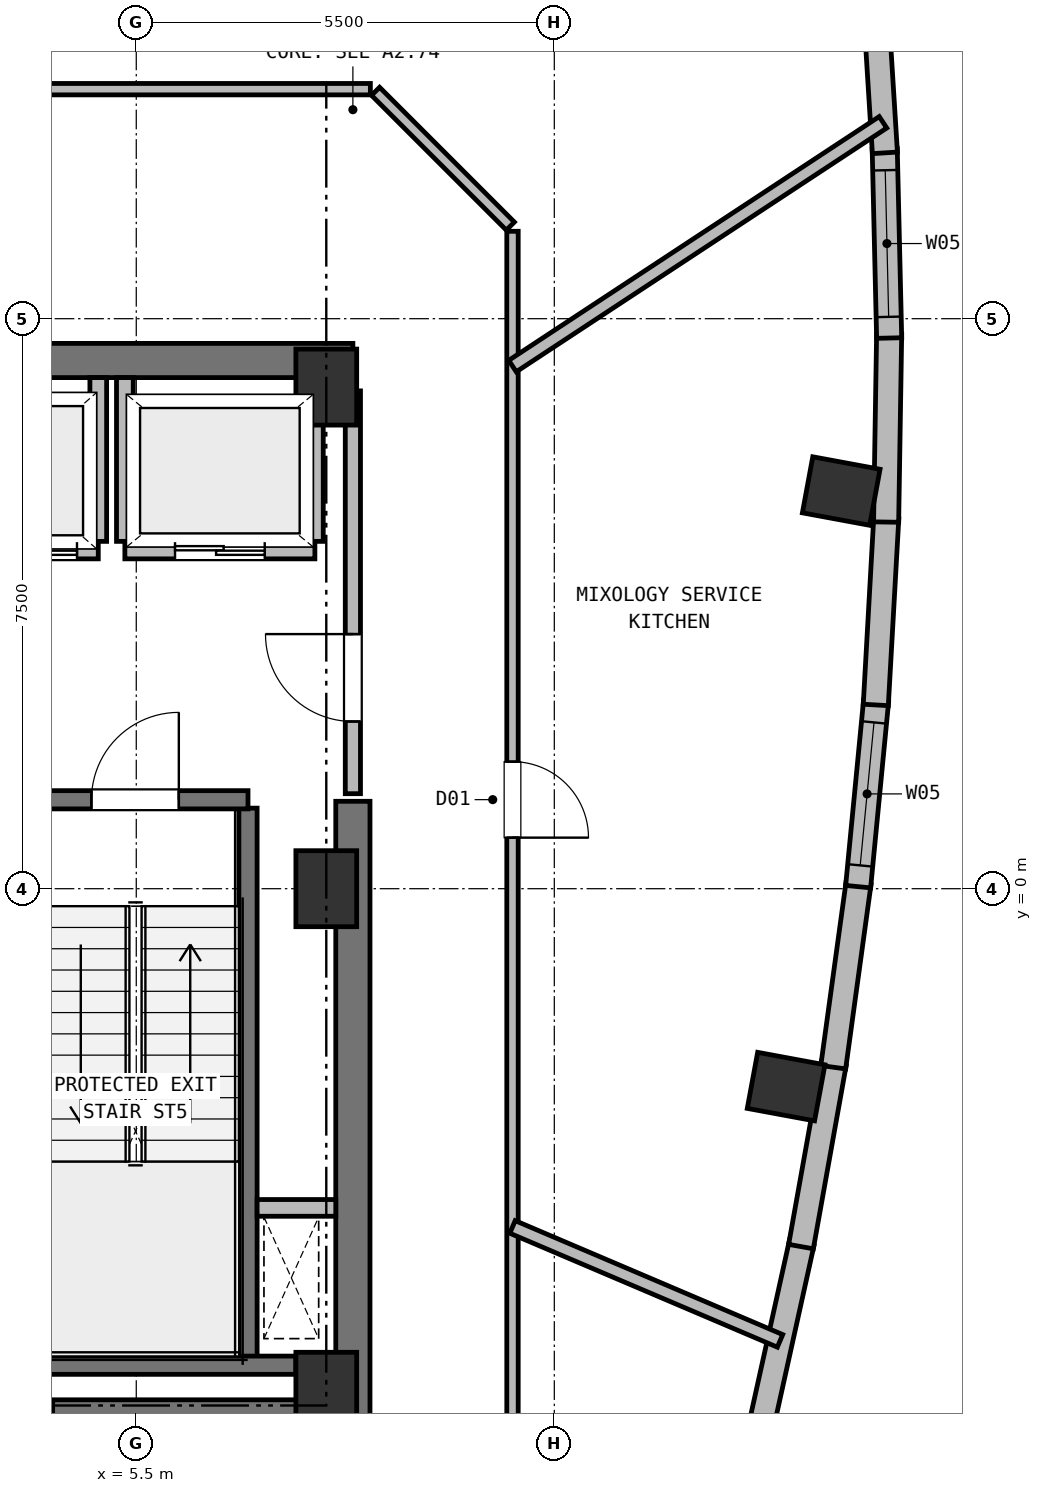
"""IFC4 building model, lengths in metres.
Left out: names, types, materials, properties, quantities, classifications, styles, units other than length and angle.
Written with IfcOpenShell. Run it as: python <this file> out.ifc"""

import sys

from ifc_helpers import new_model, si_unit, direction, frame, frame_2d, origin, origin_2d, place, context, subcontext, project, spatial, rectangle, extrude, element, fill, save


model = new_model("IFC4")
c1 = context("Model", 3, precision=1e-05, world=origin(), true_north=direction((0.0, 1.0)))
c2 = subcontext(c1, "Body", "Model", "MODEL_VIEW")
j1 = project(units=[si_unit("LENGTHUNIT", "METRE"), si_unit("PLANEANGLEUNIT", "RADIAN")], contexts=[c1])
p1 = place(None, origin())
s1 = spatial("IfcSite", under=j1, at=p1, CompositionType="ELEMENT")
p2 = place(p1, origin())
s2 = spatial("IfcBuilding", under=s1, at=p2, CompositionType="ELEMENT")
p3 = place(p2, frame((0.0, 0.0, 281.6)))
s3 = spatial("IfcBuildingStorey", under=s2, at=p3, CompositionType="ELEMENT", Elevation=281.6)
for number, where, z_axis, x_axis in (
    (1, (8.0, -6.6, 0.0), (0.0, 0.0, 1.0), (1.0, 0.0, 0.0)),
    (2, (8.0, 0.0, 0.0), (0.0, 0.0, 1.0), (1.0, 0.0, 0.0)),
    (3, (8.0, 6.6, 0.0), (0.0, 0.0, 1.0), (1.0, 0.0, 0.0)),
):
    element("IfcColumn", number, at=place(p3, frame(where, z_axis=z_axis, x_axis=x_axis)), inside=s3, PredefinedType="COLUMN", context=c2, shape_type="SweptSolid", body=[
        extrude(rectangle(XDim=0.8, YDim=1.0, at=origin_2d()), origin(), (0.0, 0.0, 1.0), 4.4),
    ])
p4 = place(p3, frame((-8.35, 6.95, 0.0), z_axis=(0.0, 0.0, 1.0), x_axis=(1.0, 0.0, 0.0)))
e4 = element("IfcWall", 4, at=p4, inside=s3, PredefinedType="SHEAR", context=c2, shape_type="SweptSolid", body=[
    extrude(rectangle(XDim=16.7, YDim=0.45, at=frame_2d((8.35, 0.0))), origin(), (0.0, 0.0, 1.0), 4.13),
])
p5 = place(p3, frame((4.4, -6.95, 0.0), z_axis=(0.0, 0.0, 1.0), x_axis=(1.0, 0.0, 0.0)))
e5 = element("IfcWall", 5, at=p5, inside=s3, PredefinedType="SHEAR", context=c2, shape_type="SweptSolid", body=[
    extrude(rectangle(XDim=3.95, YDim=0.45, at=frame_2d((1.975, 0.0))), origin(), (0.0, 0.0, 1.0), 4.13),
])
p6 = place(p3, frame((8.35, -6.95, 0.0), z_axis=(0.0, 0.0, 1.0), x_axis=(0.0, 1.0, 0.0)))
e6 = element("IfcWall", 6, at=p6, inside=s3, PredefinedType="SHEAR", context=c2, shape_type="SweptSolid", body=[
    extrude(rectangle(XDim=8.1, YDim=0.45, at=frame_2d((4.05, 0.0))), origin(), (0.0, 0.0, 1.0), 4.13),
])
for number, where, z_axis, x_axis in (
    (7, (14.05, -2.604, 0.0), (0.0, 0.0, 1.0), (0.182, 0.983, 0.0)),
    (8, (14.775, 5.232, 0.0), (0.0, 0.0, 1.0), (0.182, 0.983, 0.0)),
):
    element("IfcColumn", number, at=place(p3, frame(where, z_axis=z_axis, x_axis=x_axis)), inside=s3, PredefinedType="COLUMN", context=c2, shape_type="SweptSolid", body=[
        extrude(rectangle(XDim=0.75, YDim=0.9, at=origin_2d()), origin(), (0.0, 0.0, 1.0), 4.4),
    ])
p7 = place(p3, frame((14.255, -4.66, 0.0), z_axis=(0.0, 0.0, 1.0), x_axis=(-0.216160793087, -0.976357778446, 0.0)))
e9 = element("IfcWall", 9, at=p7, inside=s3, PredefinedType="SOLIDWALL", context=c2, shape_type="SweptSolid", body=[
    extrude(rectangle(XDim=2.452, YDim=0.33, at=frame_2d((1.226, 0.0))), origin(), (0.0, 0.0, 1.0), 4.13),
])
p8 = place(p3, frame((14.677, -2.299, 0.0), z_axis=(0.0, 0.0, 1.0), x_axis=(-0.176418802695, -0.984315196497, 0.0)))
e10 = element("IfcWall", 10, at=p8, inside=s3, PredefinedType="SOLIDWALL", context=c2, shape_type="SweptSolid", body=[
    extrude(rectangle(XDim=2.448, YDim=0.33, at=frame_2d((1.224, 0.0))), origin(), (0.0, 0.0, 1.0), 4.13),
])
p9 = place(p3, frame((15.003, 0.077, 0.0), z_axis=(0.0, 0.0, 1.0), x_axis=(-0.136310087879, -0.990666220249, 0.0)))
e11 = element("IfcWall", 11, at=p9, inside=s3, PredefinedType="SOLIDWALL", context=c2, shape_type="SweptSolid", body=[
    extrude(rectangle(XDim=2.448, YDim=0.33, at=frame_2d((1.224, 0.0))), origin(), (0.0, 0.0, 1.0), 4.13),
])
p10 = place(p3, frame((15.233, 2.468, 0.0), z_axis=(0.0, 0.0, 1.0), x_axis=(-0.096171472172, -0.995364781344, 0.0)))
e12 = element("IfcWall", 12, at=p10, inside=s3, PredefinedType="SOLIDWALL", context=c2, shape_type="SweptSolid", body=[
    extrude(rectangle(XDim=2.452, YDim=0.33, at=frame_2d((1.226, 0.0))), origin(), (0.0, 0.0, 1.0), 4.13),
])
p11 = place(p10, frame((0.281, 0.0, 0.72)))
e13 = element("IfcOpeningElement", 13, at=p11, cuts=e12, PredefinedType="OPENING", context=c2, shape_type="SweptSolid", body=[
    extrude(rectangle(XDim=1.89, YDim=2.15, at=frame_2d((0.945, 1.075))), frame((0.0, 0.175, 0.0), z_axis=(0.0, -1.0, 0.0), x_axis=(1.0, 0.0, 0.0)), (0.0, 0.0, 1.0), 0.35),
])
p12 = place(p3, frame((15.367, 4.874, 0.0), z_axis=(0.0, 0.0, 1.0), x_axis=(-0.055970171644, -0.998432441323, 0.0)))
e14 = element("IfcWall", 14, at=p12, inside=s3, PredefinedType="SOLIDWALL", context=c2, shape_type="SweptSolid", body=[
    extrude(rectangle(XDim=2.46, YDim=0.33, at=frame_2d((1.23, 0.0))), origin(), (0.0, 0.0, 1.0), 4.13),
])
p13 = place(p3, frame((15.406, 7.295, 0.0), z_axis=(0.0, 0.0, 1.0), x_axis=(-0.016099859072, -0.999870388869, 0.0)))
e15 = element("IfcWall", 15, at=p13, inside=s3, PredefinedType="SOLIDWALL", context=c2, shape_type="SweptSolid", body=[
    extrude(rectangle(XDim=2.472, YDim=0.33, at=frame_2d((1.236, 0.0))), origin(), (0.0, 0.0, 1.0), 4.13),
])
p14 = place(p3, frame((15.347, 9.732, 0.0), z_axis=(0.0, 0.0, 1.0), x_axis=(0.023459423149, -0.999724789862, 0.0)))
e16 = element("IfcWall", 16, at=p14, inside=s3, PredefinedType="SOLIDWALL", context=c2, shape_type="SweptSolid", body=[
    extrude(rectangle(XDim=2.487, YDim=0.33, at=frame_2d((1.244, 0.0))), origin(), (0.0, 0.0, 1.0), 4.13),
])
p15 = place(p14, frame((0.279, 0.0, 0.72)))
e17 = element("IfcOpeningElement", 17, at=p15, cuts=e16, PredefinedType="OPENING", context=c2, shape_type="SweptSolid", body=[
    extrude(rectangle(XDim=1.93, YDim=2.15, at=frame_2d((0.965, 1.075))), frame((0.0, 0.175, 0.0), z_axis=(0.0, -1.0, 0.0), x_axis=(1.0, 0.0, 0.0)), (0.0, 0.0, 1.0), 0.35),
])
p16 = place(p3, frame((15.193, 12.184, 0.0), z_axis=(0.0, 0.0, 1.0), x_axis=(0.062329780416, -0.998055608908, 0.0)))
e18 = element("IfcWall", 18, at=p16, inside=s3, PredefinedType="SOLIDWALL", context=c2, shape_type="SweptSolid", body=[
    extrude(rectangle(XDim=2.507, YDim=0.33, at=frame_2d((1.253, 0.0))), origin(), (0.0, 0.0, 1.0), 4.13),
])
p17 = place(p3, frame((6.97, -6.16, 0.0), z_axis=(0.0, 0.0, 1.0), x_axis=(0.0, 1.0, 0.0)))
e19 = element("IfcWall", 19, at=p17, inside=s3, PredefinedType="SHEAR", context=c2, shape_type="SweptSolid", body=[
    extrude(rectangle(XDim=7.22, YDim=0.24, at=frame_2d((3.61, 0.0))), origin(), (0.0, 0.0, 1.0), 4.13),
])
p18 = place(p3, frame((4.01, -6.27, 0.0), z_axis=(0.0, 0.0, 1.0), x_axis=(1.0, 0.0, 0.0)))
e20 = element("IfcWall", 20, at=p18, inside=s3, PredefinedType="SHEAR", context=c2, shape_type="SweptSolid", body=[
    extrude(rectangle(XDim=3.59, YDim=0.24, at=frame_2d((1.795, 0.0))), origin(), (0.0, 0.0, 1.0), 4.13),
])
p19 = place(p3, frame((4.01, 1.17, 0.0), z_axis=(0.0, 0.0, 1.0), x_axis=(1.0, 0.0, 0.0)))
e21 = element("IfcWall", 21, at=p19, inside=s3, PredefinedType="SHEAR", context=c2, shape_type="SweptSolid", body=[
    extrude(rectangle(XDim=2.96, YDim=0.24, at=frame_2d((1.48, 0.0))), origin(), (0.0, 0.0, 1.0), 4.13),
])
p20 = place(p19, frame((0.9, 0.0, 0.0)))
e22 = element("IfcOpeningElement", 22, at=p20, cuts=e21, PredefinedType="OPENING", context=c2, shape_type="SweptSolid", body=[
    extrude(rectangle(XDim=1.15, YDim=2.15, at=frame_2d((0.575, 1.075))), frame((0.0, 0.13, 0.0), z_axis=(0.0, -1.0, 0.0), x_axis=(1.0, 0.0, 0.0)), (0.0, 0.0, 1.0), 0.26),
])
p21 = place(p3, frame((7.09, -4.2, 0.0), z_axis=(0.0, 0.0, 1.0), x_axis=(1.0, 0.0, 0.0)))
e23 = element("IfcWall", 23, at=p21, inside=s3, PredefinedType="PARTITIONING", context=c2, shape_type="SweptSolid", body=[
    extrude(rectangle(XDim=1.035, YDim=0.22, at=frame_2d((0.518, 0.0))), origin(), (0.0, 0.0, 1.0), 4.13),
])
p22 = place(p3, frame((5.35, 4.45, 0.0), z_axis=(0.0, 0.0, 1.0), x_axis=(1.0, 0.0, 0.0)))
e24 = element("IfcWall", 24, at=p22, inside=s3, PredefinedType="PARTITIONING", context=c2, shape_type="SweptSolid", body=[
    extrude(rectangle(XDim=2.5, YDim=0.22, at=frame_2d((1.25, 0.0))), origin(), (0.0, 0.0, 1.0), 4.13),
])
p23 = place(p22, frame((0.66, 0.0, 0.0)))
e25 = element("IfcOpeningElement", 25, at=p23, cuts=e24, PredefinedType="OPENING", context=c2, shape_type="SweptSolid", body=[
    extrude(rectangle(XDim=1.18, YDim=2.15, at=frame_2d((0.59, 1.075))), frame((0.0, 0.12, 0.0), z_axis=(0.0, -1.0, 0.0), x_axis=(1.0, 0.0, 0.0)), (0.0, 0.0, 1.0), 0.24),
])
p24 = place(p3, frame((5.35, 4.57, 0.0), z_axis=(0.0, 0.0, 1.0), x_axis=(0.0, 1.0, 0.0)))
e26 = element("IfcWall", 26, at=p24, inside=s3, PredefinedType="PARTITIONING", context=c2, shape_type="SweptSolid", body=[
    extrude(rectangle(XDim=2.155, YDim=0.22, at=frame_2d((1.078, 0.0))), origin(), (0.0, 0.0, 1.0), 4.13),
])
p25 = place(p3, frame((7.85, 4.57, 0.0), z_axis=(0.0, 0.0, 1.0), x_axis=(0.0, 1.0, 0.0)))
e27 = element("IfcWall", 27, at=p25, inside=s3, PredefinedType="PARTITIONING", context=c2, shape_type="SweptSolid", body=[
    extrude(rectangle(XDim=2.155, YDim=0.22, at=frame_2d((1.078, 0.0))), origin(), (0.0, 0.0, 1.0), 3.81),
])
p26 = place(p3, frame((2.6, 4.45, 0.0), z_axis=(0.0, 0.0, 1.0), x_axis=(1.0, 0.0, 0.0)))
e28 = element("IfcWall", 28, at=p26, inside=s3, PredefinedType="PARTITIONING", context=c2, shape_type="SweptSolid", body=[
    extrude(rectangle(XDim=2.4, YDim=0.22, at=frame_2d((1.2, 0.0))), origin(), (0.0, 0.0, 1.0), 4.13),
])
p27 = place(p26, frame((0.9, 0.0, 0.0)))
e29 = element("IfcOpeningElement", 29, at=p27, cuts=e28, PredefinedType="OPENING", context=c2, shape_type="SweptSolid", body=[
    extrude(rectangle(XDim=1.22, YDim=2.15, at=frame_2d((0.61, 1.075))), frame((0.0, 0.12, 0.0), z_axis=(0.0, -1.0, 0.0), x_axis=(1.0, 0.0, 0.0)), (0.0, 0.0, 1.0), 0.24),
])
p28 = place(p3, frame((5.0, 4.57, 0.0), z_axis=(0.0, 0.0, 1.0), x_axis=(0.0, 1.0, 0.0)))
e30 = element("IfcWall", 30, at=p28, inside=s3, PredefinedType="PARTITIONING", context=c2, shape_type="SweptSolid", body=[
    extrude(rectangle(XDim=2.155, YDim=0.22, at=frame_2d((1.078, 0.0))), origin(), (0.0, 0.0, 1.0), 4.13),
])
p29 = place(p3, frame((8.35, 1.25, 0.0), z_axis=(0.0, 0.0, 1.0), x_axis=(0.0, 1.0, 0.0)))
e31 = element("IfcWall", 31, at=p29, inside=s3, PredefinedType="PARTITIONING", context=c2, shape_type="SweptSolid", body=[
    extrude(rectangle(XDim=5.3, YDim=0.2, at=frame_2d((2.65, 0.0))), origin(), (0.0, 0.0, 1.0), 4.13),
])
p30 = place(p29, frame((0.95, 0.0, 0.0)))
e32 = element("IfcOpeningElement", 32, at=p30, cuts=e31, PredefinedType="OPENING", context=c2, shape_type="SweptSolid", body=[
    extrude(rectangle(XDim=1.15, YDim=2.15, at=frame_2d((0.575, 1.075))), frame((0.0, 0.11, 0.0), z_axis=(0.0, -1.0, 0.0), x_axis=(1.0, 0.0, 0.0)), (0.0, 0.0, 1.0), 0.22),
])
p31 = place(p3, frame((10.45, 8.65, 0.0), z_axis=(0.0, 0.0, 1.0), x_axis=(0.0, -1.0, 0.0)))
e33 = element("IfcWall", 33, at=p31, inside=s3, PredefinedType="PARTITIONING", context=c2, shape_type="SweptSolid", body=[
    extrude(rectangle(XDim=15.89, YDim=0.15, at=frame_2d((7.945, 0.0))), origin(), (0.0, 0.0, 1.0), 3.83),
])
p32 = place(p31, frame((6.978, 0.0, 0.0)))
e34 = element("IfcOpeningElement", 34, at=p32, cuts=e33, PredefinedType="OPENING", context=c2, shape_type="SweptSolid", body=[
    extrude(rectangle(XDim=1.0, YDim=2.15, at=frame_2d((0.5, 1.075))), frame((0.0, 0.085, 0.0), z_axis=(0.0, -1.0, 0.0), x_axis=(1.0, 0.0, 0.0)), (0.0, 0.0, 1.0), 0.17),
])
p33 = place(p3, frame((8.648, 10.492, 0.0), z_axis=(0.0, 0.0, 1.0), x_axis=(0.707106781187, -0.707106781187, 0.0)))
e35 = element("IfcWall", 35, at=p33, inside=s3, PredefinedType="PARTITIONING", context=c2, shape_type="SweptSolid", body=[
    extrude(rectangle(XDim=2.508, YDim=0.15, at=frame_2d((1.254, 0.0))), origin(), (0.0, 0.0, 1.0), 4.13),
])
p34 = place(p3, frame((-11.51, 10.52, 0.0), z_axis=(0.0, 0.0, 1.0), x_axis=(1.0, 0.0, 0.0)))
e36 = element("IfcWall", 36, at=p34, inside=s3, PredefinedType="PARTITIONING", context=c2, shape_type="SweptSolid", body=[
    extrude(rectangle(XDim=20.09, YDim=0.15, at=frame_2d((10.045, 0.0))), origin(), (0.0, 0.0, 1.0), 4.13),
])
p35 = place(p34, frame((6.452, 0.0, 0.0)))
e37 = element("IfcOpeningElement", 37, at=p35, cuts=e36, PredefinedType="OPENING", context=c2, shape_type="SweptSolid", body=[
    extrude(rectangle(XDim=0.95, YDim=2.1, at=frame_2d((0.475, 1.05))), frame((0.0, 0.085, 0.0), z_axis=(0.0, -1.0, 0.0), x_axis=(1.0, 0.0, 0.0)), (0.0, 0.0, 1.0), 0.17),
])
p36 = place(p34, frame((8.736, 0.0, 0.0)))
e38 = element("IfcOpeningElement", 38, at=p36, cuts=e36, PredefinedType="OPENING", context=c2, shape_type="SweptSolid", body=[
    extrude(rectangle(XDim=0.95, YDim=2.1, at=frame_2d((0.475, 1.05))), frame((0.0, 0.085, 0.0), z_axis=(0.0, -1.0, 0.0), x_axis=(1.0, 0.0, 0.0)), (0.0, 0.0, 1.0), 0.17),
])
p37 = place(p34, frame((2.479, 0.0, 0.0)))
e39 = element("IfcOpeningElement", 39, at=p37, cuts=e36, PredefinedType="OPENING", context=c2, shape_type="SweptSolid", body=[
    extrude(rectangle(XDim=1.0, YDim=2.15, at=frame_2d((0.5, 1.075))), frame((0.0, 0.085, 0.0), z_axis=(0.0, -1.0, 0.0), x_axis=(1.0, 0.0, 0.0)), (0.0, 0.0, 1.0), 0.17),
])
p38 = place(p34, frame((14.61, 0.0, 0.0)))
e40 = element("IfcOpeningElement", 40, at=p38, cuts=e36, PredefinedType="OPENING", context=c2, shape_type="SweptSolid", body=[
    extrude(rectangle(XDim=1.0, YDim=2.15, at=frame_2d((0.5, 1.075))), frame((0.0, 0.085, 0.0), z_axis=(0.0, -1.0, 0.0), x_axis=(1.0, 0.0, 0.0)), (0.0, 0.0, 1.0), 0.17),
])
p39 = place(p3, frame((10.45, -4.451, 0.0), z_axis=(0.0, 0.0, 1.0), x_axis=(0.920037186276, -0.391831055264, 0.0)))
e41 = element("IfcWall", 41, at=p39, inside=s3, PredefinedType="PARTITIONING", context=c2, shape_type="SweptSolid", body=[
    extrude(rectangle(XDim=3.826, YDim=0.18, at=frame_2d((1.913, 0.0))), origin(), (0.0, 0.0, 1.0), 4.13),
])
p40 = place(p3, frame((10.45, 6.876, 0.0), z_axis=(0.0, 0.0, 1.0), x_axis=(0.835369557095, 0.549688732902, 0.0)))
e42 = element("IfcWall", 42, at=p40, inside=s3, PredefinedType="PARTITIONING", context=c2, shape_type="SweptSolid", body=[
    extrude(rectangle(XDim=5.835, YDim=0.18, at=frame_2d((2.917, 0.0))), origin(), (0.0, 0.0, 1.0), 4.13),
])
p41 = place(p11, origin())
e43 = element("IfcWindow", 43, at=p41, inside=s3, PartitioningType="SINGLE_PANEL", PredefinedType="WINDOW", context=c2, shape_type="SweptSolid", body=[
    extrude(rectangle(XDim=1.89, YDim=2.15, at=frame_2d((0.945, 1.075))), frame((0.0, 0.03, 0.0), z_axis=(0.0, -1.0, 0.0), x_axis=(1.0, 0.0, 0.0)), (0.0, 0.0, 1.0), 0.06),
])
fill(e13, e43)
p42 = place(p15, origin())
e44 = element("IfcWindow", 44, at=p42, inside=s3, PartitioningType="SINGLE_PANEL", PredefinedType="WINDOW", context=c2, shape_type="SweptSolid", body=[
    extrude(rectangle(XDim=1.93, YDim=2.15, at=frame_2d((0.965, 1.075))), frame((0.0, 0.03, 0.0), z_axis=(0.0, -1.0, 0.0), x_axis=(1.0, 0.0, 0.0)), (0.0, 0.0, 1.0), 0.06),
])
fill(e17, e44)
p43 = place(p20, origin())
e45 = element("IfcDoor", 45, at=p43, inside=s3, OperationType="SINGLE_SWING_RIGHT", PredefinedType="DOOR", context=c2, shape_type="SweptSolid", body=[
    extrude(rectangle(XDim=1.15, YDim=2.15, at=frame_2d((0.575, 1.075))), frame((0.0, 0.025, 0.0), z_axis=(0.0, -1.0, 0.0), x_axis=(1.0, 0.0, 0.0)), (0.0, 0.0, 1.0), 0.05),
])
fill(e22, e45)
p44 = place(p23, origin())
e46 = element("IfcDoor", 46, at=p44, inside=s3, OperationType="DOUBLE_DOOR_SLIDING", PredefinedType="DOOR", context=c2, shape_type="SweptSolid", body=[
    extrude(rectangle(XDim=1.18, YDim=2.15, at=frame_2d((0.59, 1.075))), frame((0.0, 0.025, 0.0), z_axis=(0.0, -1.0, 0.0), x_axis=(1.0, 0.0, 0.0)), (0.0, 0.0, 1.0), 0.05),
])
fill(e25, e46)
p45 = place(p27, origin())
e47 = element("IfcDoor", 47, at=p45, inside=s3, OperationType="DOUBLE_DOOR_SLIDING", PredefinedType="DOOR", context=c2, shape_type="SweptSolid", body=[
    extrude(rectangle(XDim=1.22, YDim=2.15, at=frame_2d((0.61, 1.075))), frame((0.0, 0.025, 0.0), z_axis=(0.0, -1.0, 0.0), x_axis=(1.0, 0.0, 0.0)), (0.0, 0.0, 1.0), 0.05),
])
fill(e29, e47)
p46 = place(p30, origin())
e48 = element("IfcDoor", 48, at=p46, inside=s3, OperationType="SINGLE_SWING_RIGHT", PredefinedType="DOOR", context=c2, shape_type="SweptSolid", body=[
    extrude(rectangle(XDim=1.15, YDim=2.15, at=frame_2d((0.575, 1.075))), frame((0.0, 0.025, 0.0), z_axis=(0.0, -1.0, 0.0), x_axis=(1.0, 0.0, 0.0)), (0.0, 0.0, 1.0), 0.05),
])
fill(e32, e48)
p47 = place(p32, origin())
e49 = element("IfcDoor", 49, at=p47, inside=s3, OperationType="SINGLE_SWING_RIGHT", PredefinedType="DOOR", context=c2, shape_type="SweptSolid", body=[
    extrude(rectangle(XDim=1.0, YDim=2.15, at=frame_2d((0.5, 1.075))), frame((0.0, 0.025, 0.0), z_axis=(0.0, -1.0, 0.0), x_axis=(1.0, 0.0, 0.0)), (0.0, 0.0, 1.0), 0.05),
])
fill(e34, e49)
save(model, sys.argv[1])
